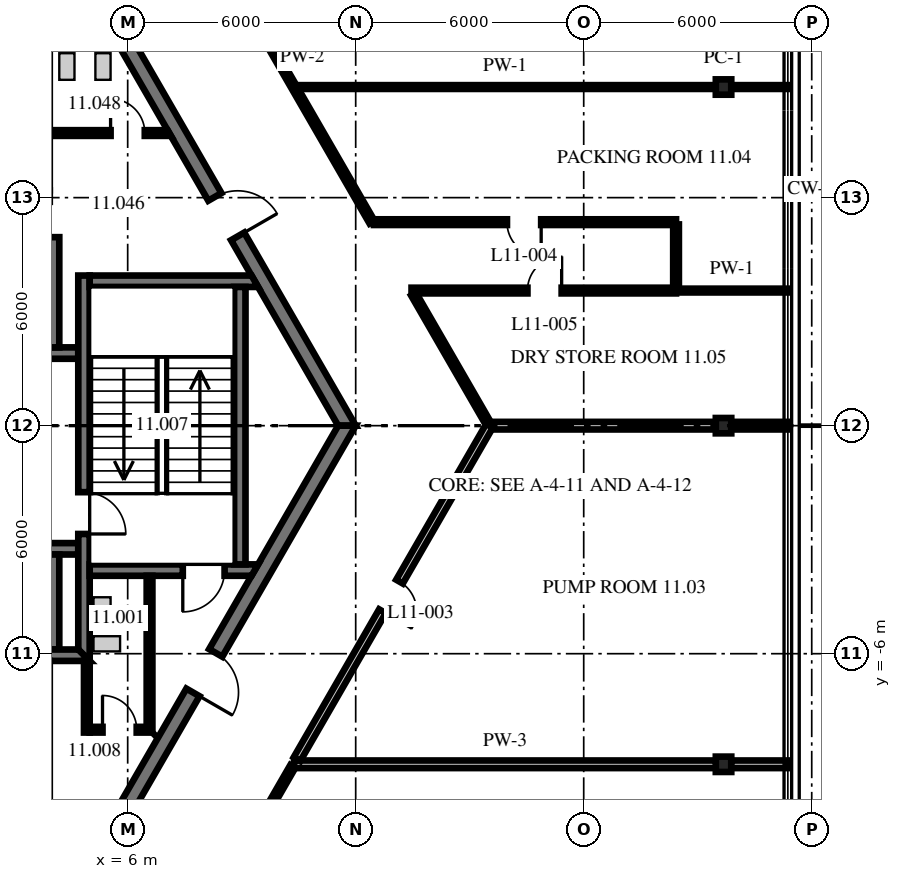
"""IFC4 building model, lengths in metres.
Left out: names, types, materials, properties, quantities, classifications, styles, units other than length and angle.
Written with IfcOpenShell. Run it as: python <this file> out.ifc"""

import sys

from ifc_helpers import new_model, si_unit, direction, frame, frame_2d, origin, origin_2d, place, context, subcontext, project, spatial, polyline, rectangle, i_section, outline, extrude, source, transform, mapped, element, fill, save


model = new_model("IFC4")
c1 = context("Model", 3, precision=1e-05, world=origin(), true_north=direction((0.0, 1.0)))
c2 = subcontext(c1, "Body", "Model", "MODEL_VIEW")
j1 = project(units=[si_unit("LENGTHUNIT", "METRE"), si_unit("PLANEANGLEUNIT", "RADIAN")], contexts=[c1])
p1 = place(None, origin())
s1 = spatial("IfcSite", under=j1, at=p1, CompositionType="ELEMENT")
p2 = place(p1, origin())
s2 = spatial("IfcBuilding", under=s1, at=p2, CompositionType="ELEMENT")
p3 = place(p2, frame((0.0, 0.0, 50.4)))
s3 = spatial("IfcBuildingStorey", under=s2, at=p3, CompositionType="ELEMENT", Elevation=50.4)
m1 = source(origin(), c2, "Body", "SweptSolid", [
    extrude(i_section(OverallWidth=0.404, OverallDepth=0.406, WebThickness=0.027, FlangeThickness=0.044, at=origin_2d()), origin(), (0.0, 0.0, 1.0), 3.15),
])
for number, where, z_axis, x_axis in (
    (1, (21.679, -8.91, 0.0), (0.0, 0.0, 1.0), (0.0, 1.0, 0.0)),
    (2, (21.679, 0.0, 0.0), (0.0, 0.0, 1.0), (0.0, 1.0, 0.0)),
    (3, (21.679, 8.91, 0.0), (0.0, 0.0, 1.0), (0.0, 1.0, 0.0)),
):
    element("IfcColumn", number, at=place(p3, frame(where, z_axis=z_axis, x_axis=x_axis)), inside=s3, PredefinedType="COLUMN", context=c2, shape_type="MappedRepresentation", body=[
        mapped(m1, transform((0.0, 0.0, 0.0), scale=1.0)),
    ])
m2 = source(origin(), c2, "Body", "SweptSolid", [
    extrude(outline(polyline([(-0.115, -0.2), (11.885, -0.2), (11.654, 0.2), (0.115, 0.2), (-0.115, -0.2)])), origin(), (0.0, 0.0, 1.0), 4.05),
])
p4 = place(p3, frame((11.769, 0.0, 0.0), z_axis=(0.0, 0.0, 1.0), x_axis=(-0.499996592174, 0.866027371285, 0.0)))
e4 = element("IfcWall", 4, at=p4, inside=s3, PredefinedType="SHEAR", context=c2, shape_type="MappedRepresentation", body=[
    mapped(m2, transform((0.0, 0.0, 0.0), scale=1.0)),
])
p5 = place(p4, frame((5.75, 0.0, 0.0)))
e5 = element("IfcOpeningElement", 5, at=p5, cuts=e4, PredefinedType="OPENING", context=c2, shape_type="SweptSolid", body=[
    extrude(rectangle(XDim=1.2, YDim=2.1, at=frame_2d((0.6, 1.05))), frame((0.0, 0.21, 0.0), z_axis=(0.0, -1.0, 0.0), x_axis=(1.0, 0.0, 0.0)), (0.0, 0.0, 1.0), 0.42),
])
p6 = place(p3, frame((5.885, -10.192, 0.0), z_axis=(0.0, 0.0, 1.0), x_axis=(0.499996592174, 0.866027371285, 0.0)))
e6 = element("IfcWall", 6, at=p6, inside=s3, PredefinedType="SHEAR", context=c2, shape_type="MappedRepresentation", body=[
    mapped(m2, transform((0.0, 0.0, 0.0), scale=1.0)),
])
p7 = place(p6, frame((3.665, 0.0, 0.0)))
e7 = element("IfcOpeningElement", 7, at=p7, cuts=e6, PredefinedType="OPENING", context=c2, shape_type="SweptSolid", body=[
    extrude(rectangle(XDim=1.2, YDim=2.1, at=frame_2d((0.6, 1.05))), frame((0.0, 0.21, 0.0), z_axis=(0.0, -1.0, 0.0), x_axis=(1.0, 0.0, 0.0)), (0.0, 0.0, 1.0), 0.42),
])
m3 = source(origin(), c2, "Body", "SweptSolid", [
    extrude(rectangle(XDim=3.0, YDim=0.3, at=frame_2d((1.5, 0.0))), origin(), (0.0, 0.0, 1.0), 4.05),
])
p8 = place(p3, frame((1.7, 1.91, 0.0), z_axis=(0.0, 0.0, 1.0), x_axis=(1.0, 0.0, 0.0)))
e8 = element("IfcWall", 8, at=p8, inside=s3, PredefinedType="SHEAR", context=c2, shape_type="MappedRepresentation", body=[
    mapped(m3, transform((0.0, 0.0, 0.0), scale=1.0)),
])
p9 = place(p8, frame((0.55, 0.0, 0.0)))
e9 = element("IfcOpeningElement", 9, at=p9, cuts=e8, PredefinedType="OPENING", context=c2, shape_type="SweptSolid", body=[
    extrude(rectangle(XDim=1.1, YDim=2.1, at=frame_2d((0.55, 1.05))), frame((0.0, 0.16, 0.0), z_axis=(0.0, -1.0, 0.0), x_axis=(1.0, 0.0, 0.0)), (0.0, 0.0, 1.0), 0.32),
])
p10 = place(p3, frame((4.05, 2.06, 0.0), z_axis=(0.0, 0.0, 1.0), x_axis=(0.0, 1.0, 0.0)))
e10 = element("IfcWall", 10, at=p10, inside=s3, PredefinedType="SHEAR", context=c2, shape_type="SweptSolid", body=[
    extrude(rectangle(XDim=2.9, YDim=0.3, at=frame_2d((1.45, 0.0))), origin(), (0.0, 0.0, 1.0), 4.05),
])
p11 = place(p3, frame((-8.1, -3.24, 0.0), z_axis=(0.0, 0.0, 1.0), x_axis=(1.0, 0.0, 0.0)))
e11 = element("IfcWall", 11, at=p11, inside=s3, PredefinedType="SHEAR", context=c2, shape_type="SweptSolid", body=[
    extrude(rectangle(XDim=12.8, YDim=0.3, at=frame_2d((6.4, 0.0))), origin(), (0.0, 0.0, 1.0), 4.05),
])
p12 = place(p11, frame((1.113, 0.0, 0.0)))
e12 = element("IfcOpeningElement", 12, at=p12, cuts=e11, PredefinedType="OPENING", context=c2, shape_type="SweptSolid", body=[
    extrude(rectangle(XDim=0.9, YDim=2.1, at=frame_2d((0.45, 1.05))), frame((0.0, 0.16, 0.0), z_axis=(0.0, -1.0, 0.0), x_axis=(1.0, 0.0, 0.0)), (0.0, 0.0, 1.0), 0.32),
])
p13 = place(p11, frame((5.788, 0.0, 0.0)))
e13 = element("IfcOpeningElement", 13, at=p13, cuts=e11, PredefinedType="OPENING", context=c2, shape_type="SweptSolid", body=[
    extrude(rectangle(XDim=0.9, YDim=2.1, at=frame_2d((0.45, 1.05))), frame((0.0, 0.16, 0.0), z_axis=(0.0, -1.0, 0.0), x_axis=(1.0, 0.0, 0.0)), (0.0, 0.0, 1.0), 0.32),
])
p14 = place(p11, frame((10.35, 0.0, 0.0)))
e14 = element("IfcOpeningElement", 14, at=p14, cuts=e11, PredefinedType="OPENING", context=c2, shape_type="SweptSolid", body=[
    extrude(rectangle(XDim=1.1, YDim=2.1, at=frame_2d((0.55, 1.05))), frame((0.0, 0.16, 0.0), z_axis=(0.0, -1.0, 0.0), x_axis=(1.0, 0.0, 0.0)), (0.0, 0.0, 1.0), 0.32),
])
m4 = source(origin(), c2, "Body", "SweptSolid", [
    extrude(rectangle(XDim=2.5, YDim=0.3, at=frame_2d((1.25, 0.0))), origin(), (0.0, 0.0, 1.0), 4.05),
])
p15 = place(p3, frame((4.05, -5.89, 0.0), z_axis=(0.0, 0.0, 1.0), x_axis=(0.0, 1.0, 0.0)))
e15 = element("IfcWall", 15, at=p15, inside=s3, PredefinedType="SHEAR", context=c2, shape_type="MappedRepresentation", body=[
    mapped(m4, transform((0.0, 0.0, 0.0), scale=1.0)),
])
p16 = place(p3, frame((4.85, -6.04, 0.0), z_axis=(0.0, 0.0, 1.0), x_axis=(0.0, 1.0, 0.0)))
e16 = element("IfcWall", 16, at=p16, inside=s3, PredefinedType="SHEAR", context=c2, shape_type="SweptSolid", body=[
    extrude(outline(polyline([(-0.15, -0.15), (9.99, -0.15), (9.99, 0.15), (0.15, 0.15), (-0.15, -0.15)])), origin(), (0.0, 0.0, 1.0), 4.05),
])
p17 = place(p16, frame((3.19, 0.0, 0.0)))
e17 = element("IfcOpeningElement", 17, at=p17, cuts=e16, PredefinedType="OPENING", context=c2, shape_type="SweptSolid", body=[
    extrude(rectangle(XDim=1.1, YDim=2.1, at=frame_2d((0.55, 1.05))), frame((0.0, 0.16, 0.0), z_axis=(0.0, -1.0, 0.0), x_axis=(1.0, 0.0, 0.0)), (0.0, 0.0, 1.0), 0.32),
])
p18 = place(p3, frame((5.0, 3.8, 0.0), z_axis=(0.0, 0.0, 1.0), x_axis=(1.0, 0.0, 0.0)))
e18 = element("IfcWall", 18, at=p18, inside=s3, PredefinedType="SHEAR", context=c2, shape_type="SweptSolid", body=[
    extrude(outline(polyline([(0.0, -0.15), (0.0, 0.15), (4.26, 0.15), (4.433, -0.15), (0.0, -0.15)])), origin(), (0.0, 0.0, 1.0), 4.05),
])
p19 = place(p3, frame((5.0, -3.8, 0.0), z_axis=(0.0, 0.0, 1.0), x_axis=(1.0, 0.0, 0.0)))
e19 = element("IfcWall", 19, at=p19, inside=s3, PredefinedType="SHEAR", context=c2, shape_type="SweptSolid", body=[
    extrude(outline(polyline([(0.0, -0.15), (0.0, 0.15), (4.433, 0.15), (4.26, -0.15), (0.0, -0.15)])), origin(), (0.0, 0.0, 1.0), 4.05),
])
p20 = place(p19, frame((2.45, 0.0, 0.0)))
e20 = element("IfcOpeningElement", 20, at=p20, cuts=e19, PredefinedType="OPENING", context=c2, shape_type="SweptSolid", body=[
    extrude(rectangle(XDim=1.1, YDim=2.1, at=frame_2d((0.55, 1.05))), frame((0.0, 0.16, 0.0), z_axis=(0.0, -1.0, 0.0), x_axis=(1.0, 0.0, 0.0)), (0.0, 0.0, 1.0), 0.32),
])
p21 = place(p3, frame((8.95, -3.65, 0.0), z_axis=(0.0, 0.0, 1.0), x_axis=(0.0, 1.0, 0.0)))
e21 = element("IfcWall", 21, at=p21, inside=s3, PredefinedType="SHEAR", context=c2, shape_type="SweptSolid", body=[
    extrude(rectangle(XDim=7.3, YDim=0.3, at=frame_2d((3.65, 0.0))), origin(), (0.0, 0.0, 1.0), 4.05),
])
p22 = place(p3, frame((-3.95, -6.04, 0.0), z_axis=(0.0, 0.0, 1.0), x_axis=(1.0, 0.0, 0.0)))
e22 = element("IfcWall", 22, at=p22, inside=s3, PredefinedType="SHEAR", context=c2, shape_type="SweptSolid", body=[
    extrude(outline(polyline([(0.0, -0.15), (8.95, -0.15), (8.65, 0.15), (0.0, 0.15), (0.0, -0.15)])), origin(), (0.0, 0.0, 1.0), 4.05),
])
p23 = place(p3, frame((5.0, -8.0, 0.0), z_axis=(0.0, 0.0, 1.0), x_axis=(1.0, 0.0, 0.0)))
e23 = element("IfcWall", 23, at=p23, inside=s3, PredefinedType="PARTITIONING", context=c2, shape_type="SweptSolid", body=[
    extrude(outline(polyline([(0.0, -0.075), (1.65, -0.075), (1.5, 0.075), (0.0, 0.075), (0.0, -0.075)])), origin(), (0.0, 0.0, 1.0), 4.05),
])
p24 = place(p23, frame((0.337, 0.0, 0.0)))
e24 = element("IfcOpeningElement", 24, at=p24, cuts=e23, PredefinedType="OPENING", context=c2, shape_type="SweptSolid", body=[
    extrude(rectangle(XDim=0.9, YDim=2.1, at=frame_2d((0.45, 1.05))), frame((0.0, 0.085, 0.0), z_axis=(0.0, -1.0, 0.0), x_axis=(1.0, 0.0, 0.0)), (0.0, 0.0, 1.0), 0.17),
])
p25 = place(p3, frame((6.575, -8.0, 0.0), z_axis=(0.0, 0.0, 1.0), x_axis=(0.0, 1.0, 0.0)))
e25 = element("IfcWall", 25, at=p25, inside=s3, PredefinedType="PARTITIONING", context=c2, shape_type="SweptSolid", body=[
    extrude(outline(polyline([(-0.075, -0.075), (4.05, -0.075), (4.05, 0.075), (0.075, 0.075), (-0.075, -0.075)])), origin(), (0.0, 0.0, 1.0), 4.05),
])
p26 = place(p3, frame((4.925, -8.075, 0.0), z_axis=(0.0, 0.0, 1.0), x_axis=(0.0, 1.0, 0.0)))
e26 = element("IfcWall", 26, at=p26, inside=s3, PredefinedType="PARTITIONING", context=c2, shape_type="SweptSolid", body=[
    extrude(rectangle(XDim=1.885, YDim=0.15, at=frame_2d((0.942, 0.0))), origin(), (0.0, 0.0, 1.0), 4.05),
])
p27 = place(p3, frame((3.95, 7.7, 0.0), z_axis=(0.0, 0.0, 1.0), x_axis=(1.0, 0.0, 0.0)))
e27 = element("IfcWall", 27, at=p27, inside=s3, PredefinedType="PARTITIONING", context=c2, shape_type="SweptSolid", body=[
    extrude(outline(polyline([(0.0, -0.075), (0.0, 0.075), (3.102, 0.075), (3.188, -0.075), (0.0, -0.075)])), origin(), (0.0, 0.0, 1.0), 4.05),
])
p28 = place(p27, frame((1.6, 0.0, 0.0)))
e28 = element("IfcOpeningElement", 28, at=p28, cuts=e27, PredefinedType="OPENING", context=c2, shape_type="SweptSolid", body=[
    extrude(rectangle(XDim=0.9, YDim=2.1, at=frame_2d((0.45, 1.05))), frame((0.0, 0.085, 0.0), z_axis=(0.0, -1.0, 0.0), x_axis=(1.0, 0.0, 0.0)), (0.0, 0.0, 1.0), 0.17),
])
p29 = place(p3, frame((7.761, 13.442, 0.0), z_axis=(0.0, 0.0, 1.0), x_axis=(0.500005339912, -0.866022320763, 0.0)))
e29 = element("IfcWall", 29, at=p29, inside=s3, PredefinedType="PARTITIONING", context=c2, shape_type="SweptSolid", body=[
    extrude(rectangle(XDim=9.338, YDim=0.15, at=frame_2d((4.669, 0.0))), origin(), (0.0, 0.0, 1.0), 4.05),
])
p30 = place(p29, frame((2.183, 0.0, 0.0)))
e30 = element("IfcOpeningElement", 30, at=p30, cuts=e29, PredefinedType="OPENING", context=c2, shape_type="SweptSolid", body=[
    extrude(rectangle(XDim=0.9, YDim=2.1, at=frame_2d((0.45, 1.05))), frame((0.0, 0.085, 0.0), z_axis=(0.0, -1.0, 0.0), x_axis=(1.0, 0.0, 0.0)), (0.0, 0.0, 1.0), 0.17),
])
p31 = place(p3, frame((13.524, 3.46, 0.0), z_axis=(0.0, 0.0, 1.0), x_axis=(0.500006044118, -0.866021914183, 0.0)))
e31 = element("IfcWall", 31, at=p31, inside=s3, PredefinedType="PARTITIONING", context=c2, shape_type="SweptSolid", body=[
    extrude(rectangle(XDim=3.925, YDim=0.15, at=frame_2d((1.962, 0.0))), origin(), (0.0, 0.0, 1.0), 4.05),
])
m5 = source(origin(), c2, "Body", "SweptSolid", [
    extrude(rectangle(XDim=11.109, YDim=0.2, at=frame_2d((5.554, 0.0))), origin(), (0.0, 0.0, 1.0), 3.293),
])
p32 = place(p3, frame((10.378, -8.91, 0.0), z_axis=(0.0, 0.0, 1.0), x_axis=(1.0, 0.0, 0.0)))
e32 = element("IfcWall", 32, at=p32, inside=s3, PredefinedType="PARTITIONING", context=c2, shape_type="MappedRepresentation", body=[
    mapped(m5, transform((0.0, 0.0, 0.0), scale=1.0)),
])
m6 = source(origin(), c2, "Body", "SweptSolid", [
    extrude(rectangle(XDim=1.499, YDim=0.2, at=frame_2d((0.749, 0.0))), origin(), (0.0, 0.0, 1.0), 4.05),
])
p33 = place(p3, frame((21.873, -8.91, 0.0), z_axis=(0.0, 0.0, 1.0), x_axis=(1.0, 0.0, 0.0)))
e33 = element("IfcWall", 33, at=p33, inside=s3, PredefinedType="PARTITIONING", context=c2, shape_type="MappedRepresentation", body=[
    mapped(m6, transform((0.0, 0.0, 0.0), scale=1.0)),
])
p34 = place(p3, frame((15.592, 0.0, 0.0), z_axis=(0.0, 0.0, 1.0), x_axis=(1.0, 0.0, 0.0)))
e34 = element("IfcWall", 34, at=p34, inside=s3, PredefinedType="PARTITIONING", context=c2, shape_type="SweptSolid", body=[
    extrude(rectangle(XDim=5.895, YDim=0.2, at=frame_2d((2.947, 0.0))), origin(), (0.0, 0.0, 1.0), 3.438),
])
p35 = place(p3, frame((21.873, 0.0, 0.0), z_axis=(0.0, 0.0, 1.0), x_axis=(1.0, 0.0, 0.0)))
e35 = element("IfcWall", 35, at=p35, inside=s3, PredefinedType="PARTITIONING", context=c2, shape_type="MappedRepresentation", body=[
    mapped(m6, transform((0.0, 0.0, 0.0), scale=1.0)),
])
p36 = place(p3, frame((13.469, 3.555, 0.0), z_axis=(0.0, 0.0, 1.0), x_axis=(1.0, 0.0, 0.0)))
e36 = element("IfcWall", 36, at=p36, inside=s3, PredefinedType="PARTITIONING", context=c2, shape_type="SweptSolid", body=[
    extrude(rectangle(XDim=6.96, YDim=0.15, at=frame_2d((3.48, 0.0))), origin(), (0.0, 0.0, 1.0), 4.05),
])
p37 = place(p36, frame((3.05, 0.0, 0.0)))
e37 = element("IfcOpeningElement", 37, at=p37, cuts=e36, PredefinedType="OPENING", context=c2, shape_type="SweptSolid", body=[
    extrude(rectangle(XDim=0.9, YDim=2.1, at=frame_2d((0.45, 1.05))), frame((0.0, 0.085, 0.0), z_axis=(0.0, -1.0, 0.0), x_axis=(1.0, 0.0, 0.0)), (0.0, 0.0, 1.0), 0.17),
])
p38 = place(p3, frame((20.429, 3.555, 0.0), z_axis=(0.0, 0.0, 1.0), x_axis=(1.0, 0.0, 0.0)))
e38 = element("IfcWall", 38, at=p38, inside=s3, PredefinedType="PARTITIONING", context=c2, shape_type="SweptSolid", body=[
    extrude(rectangle(XDim=2.942, YDim=0.1, at=frame_2d((1.471, 0.0))), origin(), (0.0, 0.0, 1.0), 4.05),
])
p39 = place(p3, frame((12.48, 5.355, 0.0), z_axis=(0.0, 0.0, 1.0), x_axis=(1.0, 0.0, 0.0)))
e39 = element("IfcWall", 39, at=p39, inside=s3, PredefinedType="PARTITIONING", context=c2, shape_type="SweptSolid", body=[
    extrude(rectangle(XDim=7.949, YDim=0.15, at=frame_2d((3.975, 0.0))), origin(), (0.0, 0.0, 1.0), 4.05),
])
p40 = place(p39, frame((3.5, 0.0, 0.0)))
e40 = element("IfcOpeningElement", 40, at=p40, cuts=e39, PredefinedType="OPENING", context=c2, shape_type="SweptSolid", body=[
    extrude(rectangle(XDim=0.9, YDim=2.1, at=frame_2d((0.45, 1.05))), frame((0.0, 0.085, 0.0), z_axis=(0.0, -1.0, 0.0), x_axis=(1.0, 0.0, 0.0)), (0.0, 0.0, 1.0), 0.17),
])
p41 = place(p3, frame((10.378, 8.91, 0.0), z_axis=(0.0, 0.0, 1.0), x_axis=(1.0, 0.0, 0.0)))
e41 = element("IfcWall", 41, at=p41, inside=s3, PredefinedType="PARTITIONING", context=c2, shape_type="SweptSolid", body=[
    extrude(rectangle(XDim=11.109, YDim=0.1, at=frame_2d((5.554, 0.0))), origin(), (0.0, 0.0, 1.0), 3.293),
])
m7 = source(origin(), c2, "Body", "SweptSolid", [
    extrude(rectangle(XDim=1.499, YDim=0.1, at=frame_2d((0.749, 0.0))), origin(), (0.0, 0.0, 1.0), 4.05),
])
p42 = place(p3, frame((21.873, 8.91, 0.0), z_axis=(0.0, 0.0, 1.0), x_axis=(1.0, 0.0, 0.0)))
e42 = element("IfcWall", 42, at=p42, inside=s3, PredefinedType="PARTITIONING", context=c2, shape_type="MappedRepresentation", body=[
    mapped(m7, transform((0.0, 0.0, 0.0), scale=1.0)),
])
p43 = place(p3, frame((7.776, -13.416, 0.0), z_axis=(0.0, 0.0, 1.0), x_axis=(0.50002671436, 0.866009979692, 0.0)))
e43 = element("IfcWall", 43, at=p43, inside=s3, PredefinedType="PARTITIONING", context=c2, shape_type="SweptSolid", body=[
    extrude(rectangle(XDim=5.14, YDim=0.15, at=frame_2d((2.57, 0.0))), origin(), (0.0, 0.0, 1.0), 4.05),
])
p44 = place(p43, frame((2.12, 0.0, 0.0)))
e44 = element("IfcOpeningElement", 44, at=p44, cuts=e43, PredefinedType="OPENING", context=c2, shape_type="SweptSolid", body=[
    extrude(rectangle(XDim=0.9, YDim=2.1, at=frame_2d((0.45, 1.05))), frame((0.0, 0.085, 0.0), z_axis=(0.0, -1.0, 0.0), x_axis=(1.0, 0.0, 0.0)), (0.0, 0.0, 1.0), 0.17),
])
p45 = place(p3, frame((10.456, -8.774, 0.0), z_axis=(0.0, 0.0, 1.0), x_axis=(0.500000566121, 0.866025076934, 0.0)))
e45 = element("IfcWall", 45, at=p45, inside=s3, PredefinedType="PARTITIONING", context=c2, shape_type="SweptSolid", body=[
    extrude(rectangle(XDim=10.132, YDim=0.2, at=frame_2d((5.066, 0.0))), origin(), (0.0, 0.0, 1.0), 4.05),
])
p46 = place(p45, frame((4.493, 0.0, 0.0)))
e46 = element("IfcOpeningElement", 46, at=p46, cuts=e45, PredefinedType="OPENING", context=c2, shape_type="SweptSolid", body=[
    extrude(rectangle(XDim=0.9, YDim=2.1, at=frame_2d((0.45, 1.05))), frame((0.0, 0.11, 0.0), z_axis=(0.0, -1.0, 0.0), x_axis=(1.0, 0.0, 0.0)), (0.0, 0.0, 1.0), 0.22),
])
p47 = place(p3, frame((20.429, 3.615, 0.0), z_axis=(0.0, 0.0, 1.0), x_axis=(0.0, 1.0, 0.0)))
e47 = element("IfcWall", 47, at=p47, inside=s3, PredefinedType="PARTITIONING", context=c2, shape_type="SweptSolid", body=[
    extrude(rectangle(XDim=1.68, YDim=0.15, at=frame_2d((0.84, 0.0))), origin(), (0.0, 0.0, 1.0), 4.05),
])
p48 = place(p5, frame((1.2, 0.0, 0.0), z_axis=(0.0, 0.0, 1.0), x_axis=(-1.0, 0.0, 0.0)))
e48 = element("IfcDoor", 48, at=p48, inside=s3, OperationType="SINGLE_SWING_RIGHT", PredefinedType="DOOR", context=c2, shape_type="SweptSolid", body=[
    extrude(rectangle(XDim=1.2, YDim=2.1, at=frame_2d((0.6, 1.05))), frame((0.0, 0.025, 0.0), z_axis=(0.0, -1.0, 0.0), x_axis=(1.0, 0.0, 0.0)), (0.0, 0.0, 1.0), 0.05),
])
fill(e5, e48)
p49 = place(p7, frame((1.2, 0.0, 0.0), z_axis=(0.0, 0.0, 1.0), x_axis=(-1.0, 0.0, 0.0)))
e49 = element("IfcDoor", 49, at=p49, inside=s3, OperationType="SINGLE_SWING_RIGHT", PredefinedType="DOOR", context=c2, shape_type="SweptSolid", body=[
    extrude(rectangle(XDim=1.2, YDim=2.1, at=frame_2d((0.6, 1.05))), frame((0.0, 0.025, 0.0), z_axis=(0.0, -1.0, 0.0), x_axis=(1.0, 0.0, 0.0)), (0.0, 0.0, 1.0), 0.05),
])
fill(e7, e49)
p50 = place(p17, frame((1.1, 0.0, 0.0), z_axis=(0.0, 0.0, 1.0), x_axis=(-1.0, 0.0, 0.0)))
e50 = element("IfcDoor", 50, at=p50, inside=s3, OperationType="SINGLE_SWING_RIGHT", PredefinedType="DOOR", context=c2, shape_type="SweptSolid", body=[
    extrude(rectangle(XDim=1.1, YDim=2.1, at=frame_2d((0.55, 1.05))), frame((0.0, 0.025, 0.0), z_axis=(0.0, -1.0, 0.0), x_axis=(1.0, 0.0, 0.0)), (0.0, 0.0, 1.0), 0.05),
])
fill(e17, e50)
p51 = place(p20, frame((1.1, 0.0, 0.0), z_axis=(0.0, 0.0, 1.0), x_axis=(-1.0, 0.0, 0.0)))
e51 = element("IfcDoor", 51, at=p51, inside=s3, OperationType="SINGLE_SWING_RIGHT", PredefinedType="DOOR", context=c2, shape_type="SweptSolid", body=[
    extrude(rectangle(XDim=1.1, YDim=2.1, at=frame_2d((0.55, 1.05))), frame((0.0, 0.025, 0.0), z_axis=(0.0, -1.0, 0.0), x_axis=(1.0, 0.0, 0.0)), (0.0, 0.0, 1.0), 0.05),
])
fill(e20, e51)
p52 = place(p28, origin())
e52 = element("IfcDoor", 52, at=p52, inside=s3, OperationType="SINGLE_SWING_LEFT", PredefinedType="DOOR", context=c2, shape_type="SweptSolid", body=[
    extrude(rectangle(XDim=0.9, YDim=2.1, at=frame_2d((0.45, 1.05))), frame((0.0, 0.025, 0.0), z_axis=(0.0, -1.0, 0.0), x_axis=(1.0, 0.0, 0.0)), (0.0, 0.0, 1.0), 0.05),
])
fill(e28, e52)
p53 = place(p24, origin())
e53 = element("IfcDoor", 53, at=p53, inside=s3, OperationType="SINGLE_SWING_LEFT", PredefinedType="DOOR", context=c2, shape_type="SweptSolid", body=[
    extrude(rectangle(XDim=0.9, YDim=2.1, at=frame_2d((0.45, 1.05))), frame((0.0, 0.025, 0.0), z_axis=(0.0, -1.0, 0.0), x_axis=(1.0, 0.0, 0.0)), (0.0, 0.0, 1.0), 0.05),
])
fill(e24, e53)
p54 = place(p46, origin())
e54 = element("IfcDoor", 54, at=p54, inside=s3, OperationType="SINGLE_SWING_RIGHT", PredefinedType="DOOR", context=c2, shape_type="SweptSolid", body=[
    extrude(rectangle(XDim=0.9, YDim=2.1, at=frame_2d((0.45, 1.05))), frame((0.0, 0.025, 0.0), z_axis=(0.0, -1.0, 0.0), x_axis=(1.0, 0.0, 0.0)), (0.0, 0.0, 1.0), 0.05),
])
fill(e46, e54)
p55 = place(p40, origin())
e55 = element("IfcDoor", 55, at=p55, inside=s3, OperationType="SINGLE_SWING_RIGHT", PredefinedType="DOOR", context=c2, shape_type="SweptSolid", body=[
    extrude(rectangle(XDim=0.9, YDim=2.1, at=frame_2d((0.45, 1.05))), frame((0.0, 0.025, 0.0), z_axis=(0.0, -1.0, 0.0), x_axis=(1.0, 0.0, 0.0)), (0.0, 0.0, 1.0), 0.05),
])
fill(e40, e55)
p56 = place(p37, origin())
e56 = element("IfcDoor", 56, at=p56, inside=s3, OperationType="SINGLE_SWING_LEFT", PredefinedType="DOOR", context=c2, shape_type="SweptSolid", body=[
    extrude(rectangle(XDim=0.9, YDim=2.1, at=frame_2d((0.45, 1.05))), frame((0.0, 0.025, 0.0), z_axis=(0.0, -1.0, 0.0), x_axis=(1.0, 0.0, 0.0)), (0.0, 0.0, 1.0), 0.05),
])
fill(e37, e56)
save(model, sys.argv[1])
